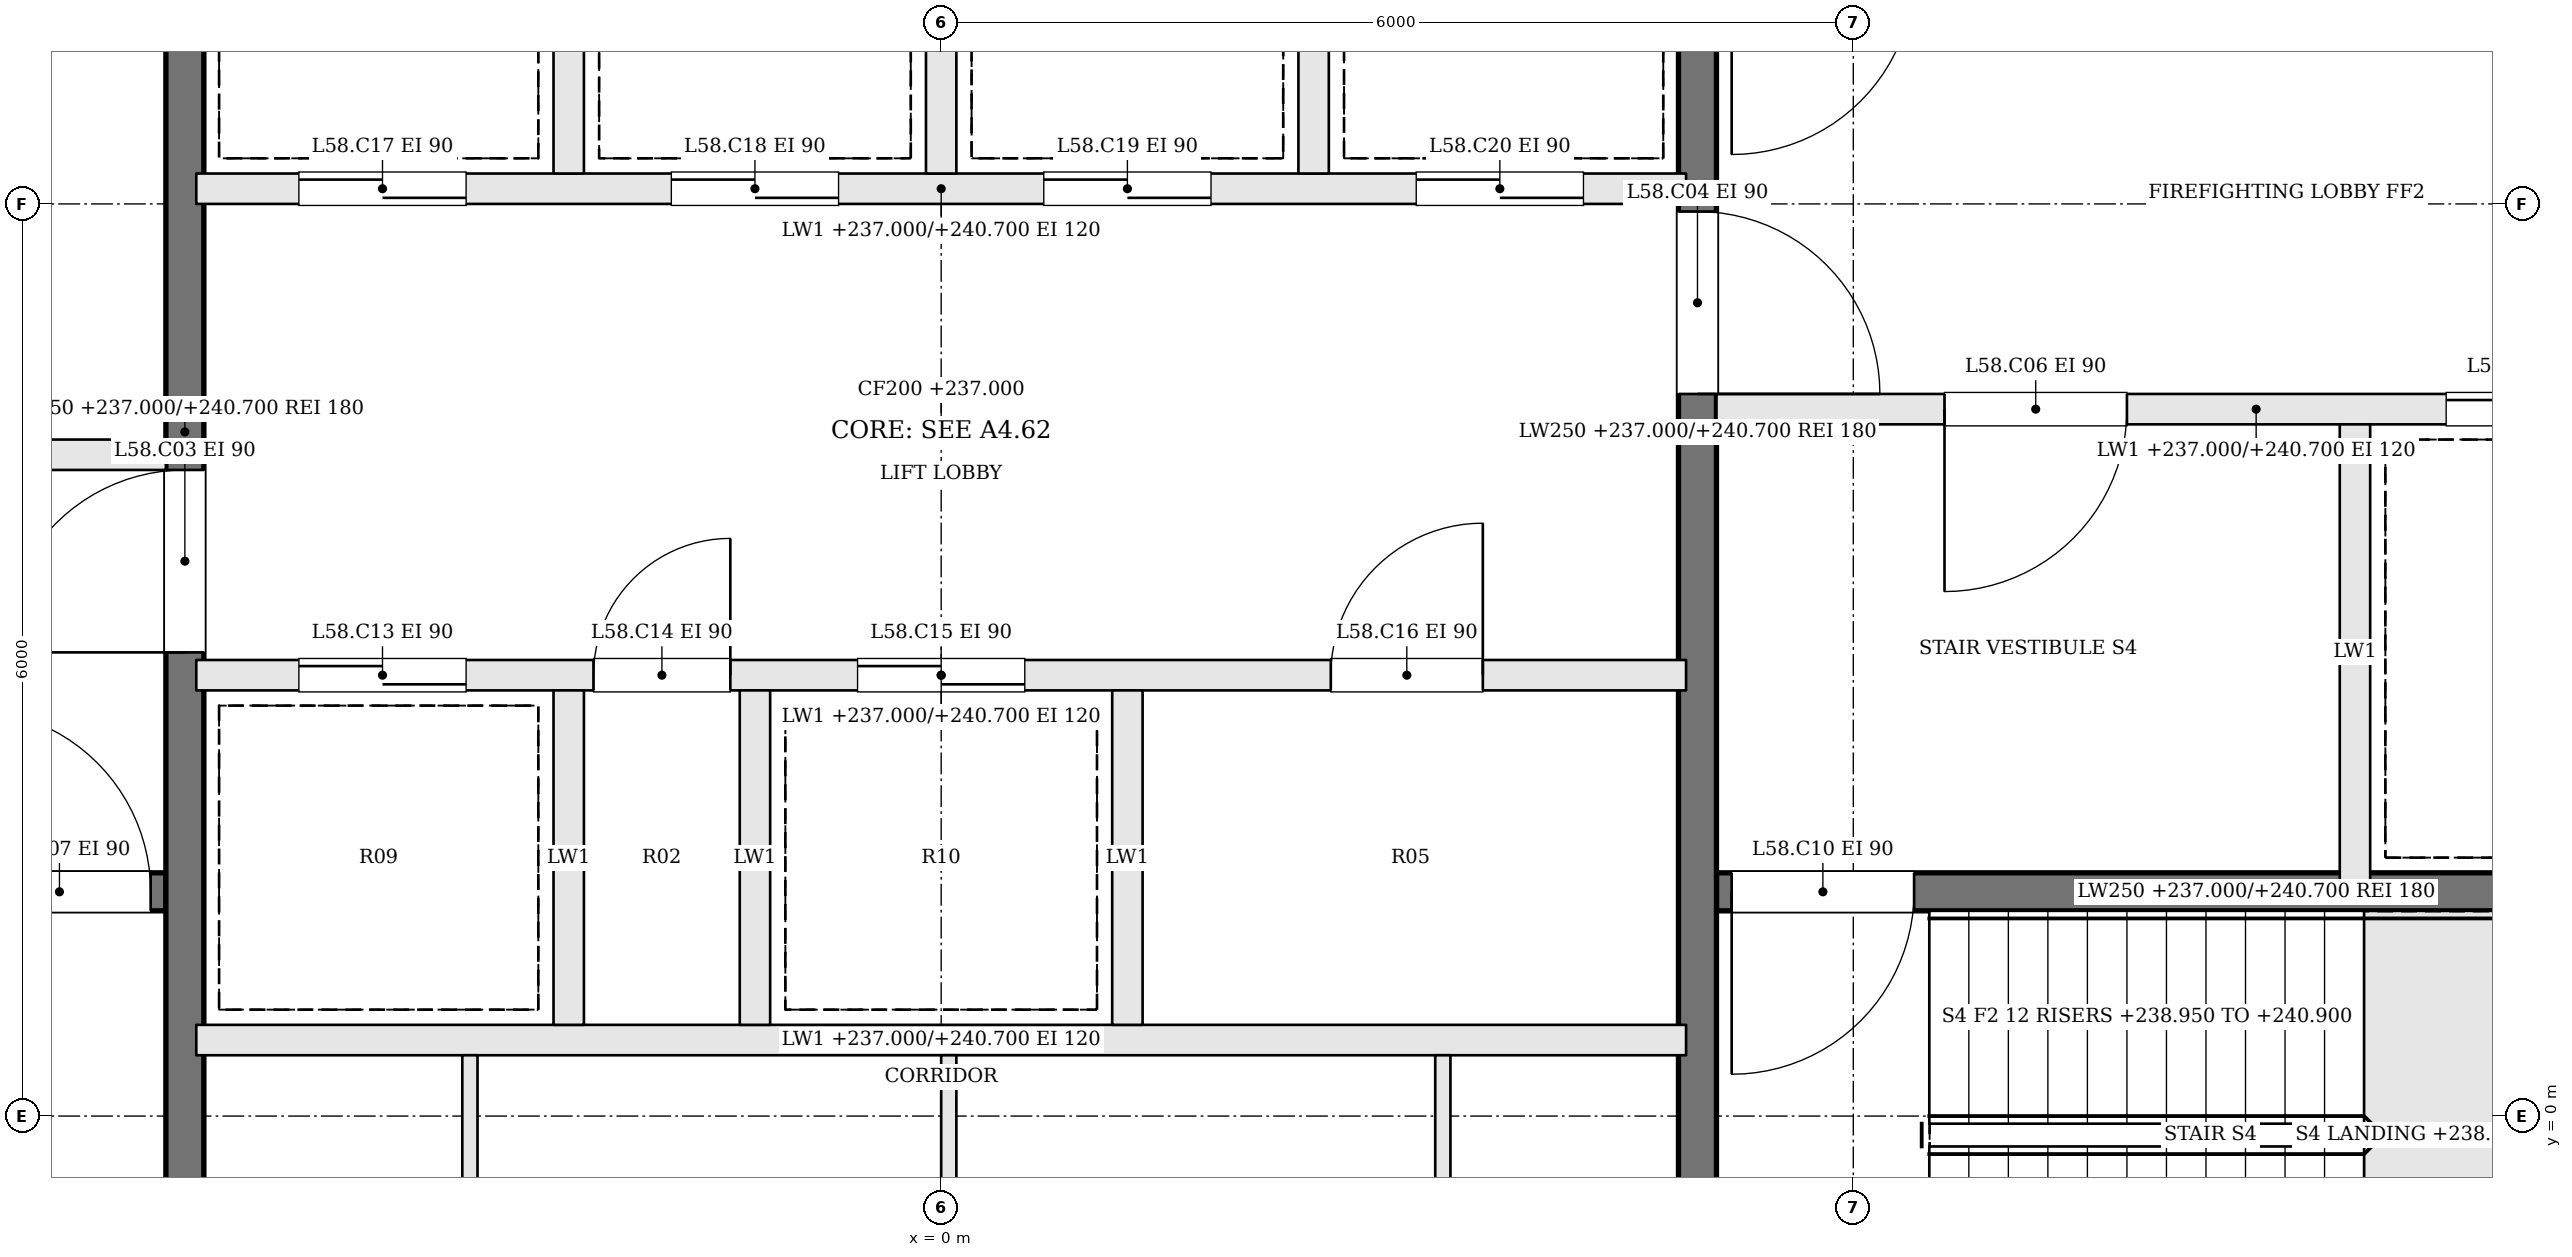
"""IFC4 building model, lengths in metres.
Left out: names, types, materials, properties, quantities, classifications, styles, units other than length and angle.
Written with IfcOpenShell. Run it as: python <this file> out.ifc"""

import sys

from ifc_helpers import new_model, si_unit, direction, frame, frame_2d, origin, place, context, subcontext, project, spatial, rectangle, extrude, element, fill, save


model = new_model("IFC4")
c1 = context("Model", 3, precision=1e-05, world=origin(), true_north=direction((0.0, 1.0)))
c2 = subcontext(c1, "Body", "Model", "MODEL_VIEW")
j1 = project(units=[si_unit("LENGTHUNIT", "METRE"), si_unit("PLANEANGLEUNIT", "RADIAN")], contexts=[c1])
p1 = place(None, origin())
s1 = spatial("IfcSite", under=j1, at=p1, CompositionType="ELEMENT")
p2 = place(p1, origin())
s2 = spatial("IfcBuilding", under=s1, at=p2, CompositionType="ELEMENT")
p3 = place(p2, frame((0.0, 0.0, 237.0)))
s3 = spatial("IfcBuildingStorey", under=s2, at=p3, CompositionType="ELEMENT", Elevation=237.0)
p4 = place(p3, frame((-12.2, 1.475, 0.0), z_axis=(0.0, 0.0, 1.0), x_axis=(1.0, 0.0, 0.0)))
e1 = element("IfcWall", 1, at=p4, inside=s3, PredefinedType="SOLIDWALL", context=c2, shape_type="SweptSolid", body=[
    extrude(rectangle(XDim=7.1, YDim=0.25, at=frame_2d((3.55, 0.0))), origin(), (0.0, 0.0, 1.0), 3.7),
])
p5 = place(p4, frame((5.8, 0.0, 0.0)))
e2 = element("IfcOpeningElement", 2, at=p5, cuts=e1, PredefinedType="OPENING", context=c2, shape_type="SweptSolid", body=[
    extrude(rectangle(XDim=1.2, YDim=2.1, at=frame_2d((0.6, 1.05))), frame((0.0, 0.135, 0.0), z_axis=(0.0, -1.0, 0.0), x_axis=(1.0, 0.0, 0.0)), (0.0, 0.0, 1.0), 0.27),
])
p6 = place(p3, frame((-12.2, 4.35, 0.0), z_axis=(0.0, 0.0, 1.0), x_axis=(1.0, 0.0, 0.0)))
e3 = element("IfcWall", 3, at=p6, inside=s3, PredefinedType="SOLIDWALL", context=c2, shape_type="SweptSolid", body=[
    extrude(rectangle(XDim=7.1, YDim=0.2, at=frame_2d((3.55, 0.0))), origin(), (0.0, 0.0, 1.0), 3.7),
])
p7 = place(p6, frame((4.4, 0.0, 0.0)))
e4 = element("IfcOpeningElement", 4, at=p7, cuts=e3, PredefinedType="OPENING", context=c2, shape_type="SweptSolid", body=[
    extrude(rectangle(XDim=1.2, YDim=2.1, at=frame_2d((0.6, 1.05))), frame((0.0, 0.11, 0.0), z_axis=(0.0, -1.0, 0.0), x_axis=(1.0, 0.0, 0.0)), (0.0, 0.0, 1.0), 0.22),
])
p8 = place(p6, frame((1.1, 0.0, 0.0)))
e5 = element("IfcOpeningElement", 5, at=p8, cuts=e3, PredefinedType="OPENING", context=c2, shape_type="SweptSolid", body=[
    extrude(rectangle(XDim=1.2, YDim=2.1, at=frame_2d((0.6, 1.05))), frame((0.0, 0.11, 0.0), z_axis=(0.0, -1.0, 0.0), x_axis=(1.0, 0.0, 0.0)), (0.0, 0.0, 1.0), 0.22),
])
p9 = place(p3, frame((12.2, 4.65, 0.0), z_axis=(0.0, 0.0, 1.0), x_axis=(-1.0, 0.0, 0.0)))
e6 = element("IfcWall", 6, at=p9, inside=s3, PredefinedType="SOLIDWALL", context=c2, shape_type="SweptSolid", body=[
    extrude(rectangle(XDim=7.1, YDim=0.2, at=frame_2d((3.55, 0.0))), origin(), (0.0, 0.0, 1.0), 3.7),
])
p10 = place(p9, frame((4.4, 0.0, 0.0)))
e7 = element("IfcOpeningElement", 7, at=p10, cuts=e6, PredefinedType="OPENING", context=c2, shape_type="SweptSolid", body=[
    extrude(rectangle(XDim=1.2, YDim=2.1, at=frame_2d((0.6, 1.05))), frame((0.0, 0.11, 0.0), z_axis=(0.0, -1.0, 0.0), x_axis=(1.0, 0.0, 0.0)), (0.0, 0.0, 1.0), 0.22),
])
p11 = place(p9, frame((1.1, 0.0, 0.0)))
e8 = element("IfcOpeningElement", 8, at=p11, cuts=e6, PredefinedType="OPENING", context=c2, shape_type="SweptSolid", body=[
    extrude(rectangle(XDim=1.2, YDim=2.1, at=frame_2d((0.6, 1.05))), frame((0.0, 0.11, 0.0), z_axis=(0.0, -1.0, 0.0), x_axis=(1.0, 0.0, 0.0)), (0.0, 0.0, 1.0), 0.22),
])
p12 = place(p3, frame((12.2, 1.475, 0.0), z_axis=(0.0, 0.0, 1.0), x_axis=(-1.0, 0.0, 0.0)))
e9 = element("IfcWall", 9, at=p12, inside=s3, PredefinedType="SOLIDWALL", context=c2, shape_type="SweptSolid", body=[
    extrude(rectangle(XDim=7.1, YDim=0.25, at=frame_2d((3.55, 0.0))), origin(), (0.0, 0.0, 1.0), 3.7),
])
p13 = place(p12, frame((5.8, 0.0, 0.0)))
e10 = element("IfcOpeningElement", 10, at=p13, cuts=e9, PredefinedType="OPENING", context=c2, shape_type="SweptSolid", body=[
    extrude(rectangle(XDim=1.2, YDim=2.1, at=frame_2d((0.6, 1.05))), frame((0.0, 0.135, 0.0), z_axis=(0.0, -1.0, 0.0), x_axis=(1.0, 0.0, 0.0)), (0.0, 0.0, 1.0), 0.27),
])
p14 = place(p3, frame((9.3, 4.55, 0.0), z_axis=(0.0, 0.0, 1.0), x_axis=(0.0, -1.0, 0.0)))
e11 = element("IfcWall", 11, at=p14, inside=s3, PredefinedType="SOLIDWALL", context=c2, shape_type="SweptSolid", body=[
    extrude(rectangle(XDim=3.0, YDim=0.2, at=frame_2d((1.5, 0.0))), origin(), (0.0, 0.0, 1.0), 3.7),
])
p15 = place(p3, frame((-4.975, -2.2, 0.0), z_axis=(0.0, 0.0, 1.0), x_axis=(0.0, 1.0, 0.0)))
e12 = element("IfcWall", 12, at=p15, inside=s3, PredefinedType="SOLIDWALL", context=c2, shape_type="SweptSolid", body=[
    extrude(rectangle(XDim=13.4, YDim=0.25, at=frame_2d((6.7, 0.0))), origin(), (0.0, 0.0, 1.0), 3.7),
])
p16 = place(p15, frame((5.25, 0.0, 0.0)))
e13 = element("IfcOpeningElement", 13, at=p16, cuts=e12, PredefinedType="OPENING", context=c2, shape_type="SweptSolid", body=[
    extrude(rectangle(XDim=1.2, YDim=2.1, at=frame_2d((0.6, 1.05))), frame((0.0, 0.135, 0.0), z_axis=(0.0, -1.0, 0.0), x_axis=(1.0, 0.0, 0.0)), (0.0, 0.0, 1.0), 0.27),
])
p17 = place(p3, frame((4.975, 11.2, 0.0), z_axis=(0.0, 0.0, 1.0), x_axis=(0.0, -1.0, 0.0)))
e14 = element("IfcWall", 14, at=p17, inside=s3, PredefinedType="SOLIDWALL", context=c2, shape_type="SweptSolid", body=[
    extrude(rectangle(XDim=13.4, YDim=0.25, at=frame_2d((6.7, 0.0))), origin(), (0.0, 0.0, 1.0), 3.7),
])
p18 = place(p17, frame((5.25, 0.0, 0.0)))
e15 = element("IfcOpeningElement", 15, at=p18, cuts=e14, PredefinedType="OPENING", context=c2, shape_type="SweptSolid", body=[
    extrude(rectangle(XDim=1.2, YDim=2.1, at=frame_2d((0.6, 1.05))), frame((0.0, 0.135, 0.0), z_axis=(0.0, -1.0, 0.0), x_axis=(1.0, 0.0, 0.0)), (0.0, 0.0, 1.0), 0.27),
])
p19 = place(p3, frame((-4.9, 0.5, 0.0), z_axis=(0.0, 0.0, 1.0), x_axis=(1.0, 0.0, 0.0)))
e16 = element("IfcWall", 16, at=p19, inside=s3, PredefinedType="SOLIDWALL", context=c2, shape_type="SweptSolid", body=[
    extrude(rectangle(XDim=9.8, YDim=0.2, at=frame_2d((4.9, 0.0))), origin(), (0.0, 0.0, 1.0), 3.7),
])
p20 = place(p3, frame((-4.9, 2.9, 0.0), z_axis=(0.0, 0.0, 1.0), x_axis=(1.0, 0.0, 0.0)))
e17 = element("IfcWall", 17, at=p20, inside=s3, PredefinedType="SOLIDWALL", context=c2, shape_type="SweptSolid", body=[
    extrude(rectangle(XDim=9.8, YDim=0.2, at=frame_2d((4.9, 0.0))), origin(), (0.0, 0.0, 1.0), 3.7),
])
p21 = place(p20, frame((0.675, 0.0, 0.0)))
e18 = element("IfcOpeningElement", 18, at=p21, cuts=e17, PredefinedType="OPENING", context=c2, shape_type="SweptSolid", body=[
    extrude(rectangle(XDim=1.1, YDim=2.1, at=frame_2d((0.55, 1.05))), frame((0.0, 0.11, 0.0), z_axis=(0.0, -1.0, 0.0), x_axis=(1.0, 0.0, 0.0)), (0.0, 0.0, 1.0), 0.22),
])
p22 = place(p20, frame((2.613, 0.0, 0.0)))
e19 = element("IfcOpeningElement", 19, at=p22, cuts=e17, PredefinedType="OPENING", context=c2, shape_type="SweptSolid", body=[
    extrude(rectangle(XDim=0.9, YDim=2.1, at=frame_2d((0.45, 1.05))), frame((0.0, 0.11, 0.0), z_axis=(0.0, -1.0, 0.0), x_axis=(1.0, 0.0, 0.0)), (0.0, 0.0, 1.0), 0.22),
])
p23 = place(p20, frame((4.35, 0.0, 0.0)))
e20 = element("IfcOpeningElement", 20, at=p23, cuts=e17, PredefinedType="OPENING", context=c2, shape_type="SweptSolid", body=[
    extrude(rectangle(XDim=1.1, YDim=2.1, at=frame_2d((0.55, 1.05))), frame((0.0, 0.11, 0.0), z_axis=(0.0, -1.0, 0.0), x_axis=(1.0, 0.0, 0.0)), (0.0, 0.0, 1.0), 0.22),
])
p24 = place(p20, frame((7.463, 0.0, 0.0)))
e21 = element("IfcOpeningElement", 21, at=p24, cuts=e17, PredefinedType="OPENING", context=c2, shape_type="SweptSolid", body=[
    extrude(rectangle(XDim=1.0, YDim=2.1, at=frame_2d((0.5, 1.05))), frame((0.0, 0.11, 0.0), z_axis=(0.0, -1.0, 0.0), x_axis=(1.0, 0.0, 0.0)), (0.0, 0.0, 1.0), 0.22),
])
p25 = place(p3, frame((-4.9, 6.1, 0.0), z_axis=(0.0, 0.0, 1.0), x_axis=(1.0, 0.0, 0.0)))
e22 = element("IfcWall", 22, at=p25, inside=s3, PredefinedType="SOLIDWALL", context=c2, shape_type="SweptSolid", body=[
    extrude(rectangle(XDim=9.8, YDim=0.2, at=frame_2d((4.9, 0.0))), origin(), (0.0, 0.0, 1.0), 3.7),
])
p26 = place(p25, frame((0.675, 0.0, 0.0)))
e23 = element("IfcOpeningElement", 23, at=p26, cuts=e22, PredefinedType="OPENING", context=c2, shape_type="SweptSolid", body=[
    extrude(rectangle(XDim=1.1, YDim=2.1, at=frame_2d((0.55, 1.05))), frame((0.0, 0.11, 0.0), z_axis=(0.0, -1.0, 0.0), x_axis=(1.0, 0.0, 0.0)), (0.0, 0.0, 1.0), 0.22),
])
p27 = place(p25, frame((3.125, 0.0, 0.0)))
e24 = element("IfcOpeningElement", 24, at=p27, cuts=e22, PredefinedType="OPENING", context=c2, shape_type="SweptSolid", body=[
    extrude(rectangle(XDim=1.1, YDim=2.1, at=frame_2d((0.55, 1.05))), frame((0.0, 0.11, 0.0), z_axis=(0.0, -1.0, 0.0), x_axis=(1.0, 0.0, 0.0)), (0.0, 0.0, 1.0), 0.22),
])
p28 = place(p25, frame((5.575, 0.0, 0.0)))
e25 = element("IfcOpeningElement", 25, at=p28, cuts=e22, PredefinedType="OPENING", context=c2, shape_type="SweptSolid", body=[
    extrude(rectangle(XDim=1.1, YDim=2.1, at=frame_2d((0.55, 1.05))), frame((0.0, 0.11, 0.0), z_axis=(0.0, -1.0, 0.0), x_axis=(1.0, 0.0, 0.0)), (0.0, 0.0, 1.0), 0.22),
])
p29 = place(p25, frame((8.025, 0.0, 0.0)))
e26 = element("IfcOpeningElement", 26, at=p29, cuts=e22, PredefinedType="OPENING", context=c2, shape_type="SweptSolid", body=[
    extrude(rectangle(XDim=1.1, YDim=2.1, at=frame_2d((0.55, 1.05))), frame((0.0, 0.11, 0.0), z_axis=(0.0, -1.0, 0.0), x_axis=(1.0, 0.0, 0.0)), (0.0, 0.0, 1.0), 0.22),
])
for number, where, z_axis, x_axis in (
    (27, (-2.45, 0.6, 0.0), (0.0, 0.0, 1.0), (0.0, 1.0, 0.0)),
    (28, (-1.225, 0.6, 0.0), (0.0, 0.0, 1.0), (0.0, 1.0, 0.0)),
    (29, (1.225, 0.6, 0.0), (0.0, 0.0, 1.0), (0.0, 1.0, 0.0)),
    (30, (-2.45, 6.2, 0.0), (0.0, 0.0, 1.0), (0.0, 1.0, 0.0)),
    (31, (0.0, 6.2, 0.0), (0.0, 0.0, 1.0), (0.0, 1.0, 0.0)),
    (32, (2.45, 6.2, 0.0), (0.0, 0.0, 1.0), (0.0, 1.0, 0.0)),
):
    element("IfcWall", number, at=place(p3, frame(where, z_axis=z_axis, x_axis=x_axis)), inside=s3, PredefinedType="SOLIDWALL", context=c2, shape_type="SweptSolid", body=[
        extrude(rectangle(XDim=2.2, YDim=0.2, at=frame_2d((1.1, 0.0))), origin(), (0.0, 0.0, 1.0), 3.7),
    ])
for number, where, z_axis, x_axis in (
    (33, (-3.1, -2.2, 0.0), (0.0, 0.0, 1.0), (0.0, 1.0, 0.0)),
    (34, (0.05, -2.2, 0.0), (0.0, 0.0, 1.0), (0.0, 1.0, 0.0)),
    (35, (3.3, -2.2, 0.0), (0.0, 0.0, 1.0), (0.0, 1.0, 0.0)),
):
    element("IfcWall", number, at=place(p3, frame(where, z_axis=z_axis, x_axis=x_axis)), inside=s3, PredefinedType="PARTITIONING", context=c2, shape_type="SweptSolid", body=[
        extrude(rectangle(XDim=2.6, YDim=0.1, at=frame_2d((1.3, 0.0))), origin(), (0.0, 0.0, 1.0), 3.7),
    ])
p30 = place(p16, origin())
e36 = element("IfcDoor", 36, at=p30, inside=s3, OperationType="SINGLE_SWING_LEFT", PredefinedType="DOOR", context=c2, shape_type="SweptSolid", body=[
    extrude(rectangle(XDim=1.2, YDim=2.1, at=frame_2d((0.6, 1.05))), frame((0.0, 0.025, 0.0), z_axis=(0.0, -1.0, 0.0), x_axis=(1.0, 0.0, 0.0)), (0.0, 0.0, 1.0), 0.05),
])
fill(e13, e36)
p31 = place(p18, origin())
e37 = element("IfcDoor", 37, at=p31, inside=s3, OperationType="SINGLE_SWING_RIGHT", PredefinedType="DOOR", context=c2, shape_type="SweptSolid", body=[
    extrude(rectangle(XDim=1.2, YDim=2.1, at=frame_2d((0.6, 1.05))), frame((0.0, 0.025, 0.0), z_axis=(0.0, -1.0, 0.0), x_axis=(1.0, 0.0, 0.0)), (0.0, 0.0, 1.0), 0.05),
])
fill(e15, e37)
p32 = place(p10, origin())
e38 = element("IfcDoor", 38, at=p32, inside=s3, OperationType="SINGLE_SWING_RIGHT", PredefinedType="DOOR", context=c2, shape_type="SweptSolid", body=[
    extrude(rectangle(XDim=1.2, YDim=2.1, at=frame_2d((0.6, 1.05))), frame((0.0, 0.025, 0.0), z_axis=(0.0, -1.0, 0.0), x_axis=(1.0, 0.0, 0.0)), (0.0, 0.0, 1.0), 0.05),
])
fill(e7, e38)
p33 = place(p5, origin())
e39 = element("IfcDoor", 39, at=p33, inside=s3, OperationType="SINGLE_SWING_LEFT", PredefinedType="DOOR", context=c2, shape_type="SweptSolid", body=[
    extrude(rectangle(XDim=1.2, YDim=2.1, at=frame_2d((0.6, 1.05))), frame((0.0, 0.025, 0.0), z_axis=(0.0, -1.0, 0.0), x_axis=(1.0, 0.0, 0.0)), (0.0, 0.0, 1.0), 0.05),
])
fill(e2, e39)
p34 = place(p13, origin())
e40 = element("IfcDoor", 40, at=p34, inside=s3, OperationType="SINGLE_SWING_RIGHT", PredefinedType="DOOR", context=c2, shape_type="SweptSolid", body=[
    extrude(rectangle(XDim=1.2, YDim=2.1, at=frame_2d((0.6, 1.05))), frame((0.0, 0.025, 0.0), z_axis=(0.0, -1.0, 0.0), x_axis=(1.0, 0.0, 0.0)), (0.0, 0.0, 1.0), 0.05),
])
fill(e10, e40)
p35 = place(p11, origin())
e41 = element("IfcDoor", 41, at=p35, inside=s3, OperationType="SLIDING_TO_RIGHT", PredefinedType="DOOR", context=c2, shape_type="SweptSolid", body=[
    extrude(rectangle(XDim=1.2, YDim=2.1, at=frame_2d((0.6, 1.05))), frame((0.0, 0.025, 0.0), z_axis=(0.0, -1.0, 0.0), x_axis=(1.0, 0.0, 0.0)), (0.0, 0.0, 1.0), 0.05),
])
fill(e8, e41)
p36 = place(p21, origin())
e42 = element("IfcDoor", 42, at=p36, inside=s3, OperationType="SLIDING_TO_RIGHT", PredefinedType="DOOR", context=c2, shape_type="SweptSolid", body=[
    extrude(rectangle(XDim=1.1, YDim=2.1, at=frame_2d((0.55, 1.05))), frame((0.0, 0.025, 0.0), z_axis=(0.0, -1.0, 0.0), x_axis=(1.0, 0.0, 0.0)), (0.0, 0.0, 1.0), 0.05),
])
fill(e18, e42)
p37 = place(p22, origin())
e43 = element("IfcDoor", 43, at=p37, inside=s3, OperationType="SINGLE_SWING_RIGHT", PredefinedType="DOOR", context=c2, shape_type="SweptSolid", body=[
    extrude(rectangle(XDim=0.9, YDim=2.1, at=frame_2d((0.45, 1.05))), frame((0.0, 0.025, 0.0), z_axis=(0.0, -1.0, 0.0), x_axis=(1.0, 0.0, 0.0)), (0.0, 0.0, 1.0), 0.05),
])
fill(e19, e43)
p38 = place(p23, origin())
e44 = element("IfcDoor", 44, at=p38, inside=s3, OperationType="SLIDING_TO_LEFT", PredefinedType="DOOR", context=c2, shape_type="SweptSolid", body=[
    extrude(rectangle(XDim=1.1, YDim=2.1, at=frame_2d((0.55, 1.05))), frame((0.0, 0.025, 0.0), z_axis=(0.0, -1.0, 0.0), x_axis=(1.0, 0.0, 0.0)), (0.0, 0.0, 1.0), 0.05),
])
fill(e20, e44)
p39 = place(p24, origin())
e45 = element("IfcDoor", 45, at=p39, inside=s3, OperationType="SINGLE_SWING_RIGHT", PredefinedType="DOOR", context=c2, shape_type="SweptSolid", body=[
    extrude(rectangle(XDim=1.0, YDim=2.1, at=frame_2d((0.5, 1.05))), frame((0.0, 0.025, 0.0), z_axis=(0.0, -1.0, 0.0), x_axis=(1.0, 0.0, 0.0)), (0.0, 0.0, 1.0), 0.05),
])
fill(e21, e45)
p40 = place(p26, origin())
e46 = element("IfcDoor", 46, at=p40, inside=s3, OperationType="SLIDING_TO_RIGHT", PredefinedType="DOOR", context=c2, shape_type="SweptSolid", body=[
    extrude(rectangle(XDim=1.1, YDim=2.1, at=frame_2d((0.55, 1.05))), frame((0.0, 0.025, 0.0), z_axis=(0.0, -1.0, 0.0), x_axis=(1.0, 0.0, 0.0)), (0.0, 0.0, 1.0), 0.05),
])
fill(e23, e46)
p41 = place(p27, origin())
e47 = element("IfcDoor", 47, at=p41, inside=s3, OperationType="SLIDING_TO_LEFT", PredefinedType="DOOR", context=c2, shape_type="SweptSolid", body=[
    extrude(rectangle(XDim=1.1, YDim=2.1, at=frame_2d((0.55, 1.05))), frame((0.0, 0.025, 0.0), z_axis=(0.0, -1.0, 0.0), x_axis=(1.0, 0.0, 0.0)), (0.0, 0.0, 1.0), 0.05),
])
fill(e24, e47)
p42 = place(p28, origin())
e48 = element("IfcDoor", 48, at=p42, inside=s3, OperationType="SLIDING_TO_RIGHT", PredefinedType="DOOR", context=c2, shape_type="SweptSolid", body=[
    extrude(rectangle(XDim=1.1, YDim=2.1, at=frame_2d((0.55, 1.05))), frame((0.0, 0.025, 0.0), z_axis=(0.0, -1.0, 0.0), x_axis=(1.0, 0.0, 0.0)), (0.0, 0.0, 1.0), 0.05),
])
fill(e25, e48)
p43 = place(p29, origin())
e49 = element("IfcDoor", 49, at=p43, inside=s3, OperationType="SLIDING_TO_LEFT", PredefinedType="DOOR", context=c2, shape_type="SweptSolid", body=[
    extrude(rectangle(XDim=1.1, YDim=2.1, at=frame_2d((0.55, 1.05))), frame((0.0, 0.025, 0.0), z_axis=(0.0, -1.0, 0.0), x_axis=(1.0, 0.0, 0.0)), (0.0, 0.0, 1.0), 0.05),
])
fill(e26, e49)
save(model, sys.argv[1])
